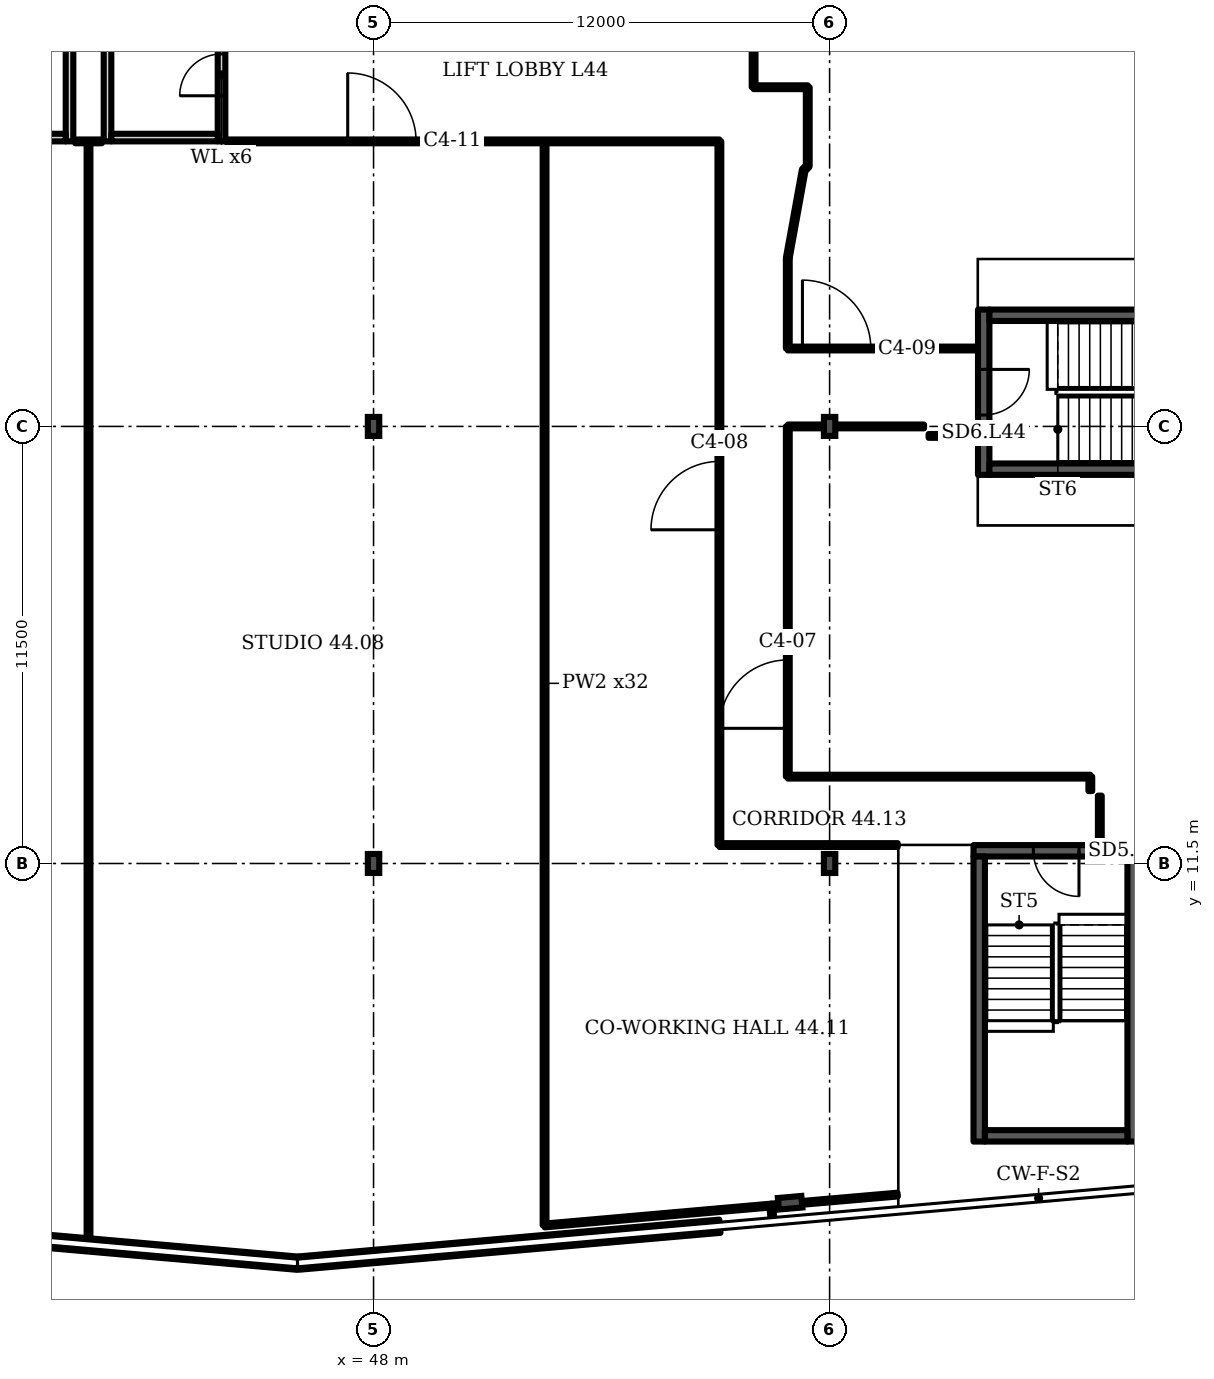
"""IFC4 building model, lengths in metres.
Left out: names, types, materials, properties, quantities, classifications, styles, units other than length and angle.
Written with IfcOpenShell. Run it as: python <this file> out.ifc"""

import sys

from ifc_helpers import new_model, si_unit, direction, frame, frame_2d, origin, origin_2d, place, context, subcontext, project, spatial, rectangle, i_section, extrude, element, fill, save


model = new_model("IFC4")
c1 = context("Model", 3, precision=1e-05, world=origin(), true_north=direction((0.0, 1.0)))
c2 = subcontext(c1, "Body", "Model", "MODEL_VIEW")
j1 = project(units=[si_unit("LENGTHUNIT", "METRE"), si_unit("PLANEANGLEUNIT", "RADIAN")], contexts=[c1])
p1 = place(None, origin())
s1 = spatial("IfcSite", under=j1, at=p1, CompositionType="ELEMENT")
p2 = place(p1, origin())
s2 = spatial("IfcBuilding", under=s1, at=p2, CompositionType="ELEMENT")
p3 = place(p2, frame((0.0, 0.0, 180.7)))
s3 = spatial("IfcBuildingStorey", under=s2, at=p3, CompositionType="ELEMENT", Elevation=180.7)
p4 = place(p3, frame((58.961, 2.573, 0.0), z_axis=(0.0, 0.0, 1.0), x_axis=(0.087156, -0.996198, 0.0)))
e1 = element("IfcColumn", 1, at=p4, inside=s3, PredefinedType="COLUMN", context=c2, shape_type="SweptSolid", body=[
    extrude(i_section(OverallWidth=0.305, OverallDepth=0.62, WebThickness=0.021, FlangeThickness=0.04, FilletRadius=0.027, at=origin_2d()), origin(), (0.0, 0.0, 1.0), 3.6),
])
for number, where, z_axis, x_axis in (
    (2, (48.0, 11.5, 0.0), (0.0, 0.0, 1.0), (1.0, 0.0, 0.0)),
    (3, (60.0, 11.5, 0.0), (0.0, 0.0, 1.0), (1.0, 0.0, 0.0)),
    (4, (48.0, 23.0, 0.0), (0.0, 0.0, 1.0), (1.0, 0.0, 0.0)),
    (5, (60.0, 23.0, 0.0), (0.0, 0.0, 1.0), (1.0, 0.0, 0.0)),
):
    element("IfcColumn", number, at=place(p3, frame(where, z_axis=z_axis, x_axis=x_axis)), inside=s3, PredefinedType="COLUMN", context=c2, shape_type="SweptSolid", body=[
        extrude(i_section(OverallWidth=0.3, OverallDepth=0.5, WebThickness=0.014, FlangeThickness=0.028, FilletRadius=0.027, at=origin_2d()), origin(), (0.0, 0.0, 1.0), 3.6),
    ])
p5 = place(p3, frame((35.03, 1.943, 0.0), z_axis=(0.0, 0.0, 1.0), x_axis=(0.996199, -0.08714, 0.0)))
e6 = element("IfcWall", 6, at=p5, inside=s3, PredefinedType="SOLIDWALL", context=c2, shape_type="SweptSolid", body=[
    extrude(rectangle(XDim=11.028, YDim=0.35, at=frame_2d((5.514, 0.0))), origin(), (0.0, 0.0, 1.0), 1.0),
])
p6 = place(p3, frame((46.045, 0.987, 0.0), z_axis=(0.0, 0.0, 1.0), x_axis=(0.996193, 0.087171, 0.0)))
e7 = element("IfcWall", 7, at=p6, inside=s3, PredefinedType="SOLIDWALL", context=c2, shape_type="SweptSolid", body=[
    extrude(rectangle(XDim=11.11, YDim=0.35, at=frame_2d((5.555, 0.0))), origin(), (0.0, 0.0, 1.0), 1.0),
])
p7 = place(p3, frame((40.0, 30.5, 0.0), z_axis=(0.0, 0.0, 1.0), x_axis=(0.0, 1.0, 0.0)))
e8 = element("IfcWall", 8, at=p7, inside=s3, PredefinedType="PARTITIONING", context=c2, shape_type="SweptSolid", body=[
    extrude(rectangle(XDim=3.5, YDim=0.2, at=frame_2d((1.75, 0.0))), origin(), (0.0, 0.0, 1.0), 3.2),
])
p8 = place(p3, frame((37.1, 30.6, 0.0), z_axis=(0.0, 0.0, 1.0), x_axis=(1.0, 0.0, 0.0)))
e9 = element("IfcWall", 9, at=p8, inside=s3, PredefinedType="PARTITIONING", context=c2, shape_type="SweptSolid", body=[
    extrude(rectangle(XDim=2.8, YDim=0.2, at=frame_2d((1.4, 0.0))), origin(), (0.0, 0.0, 1.0), 3.2),
])
p9 = place(p3, frame((41.0, 30.5, 0.0), z_axis=(0.0, 0.0, 1.0), x_axis=(0.0, 1.0, 0.0)))
e10 = element("IfcWall", 10, at=p9, inside=s3, PredefinedType="PARTITIONING", context=c2, shape_type="SweptSolid", body=[
    extrude(rectangle(XDim=3.5, YDim=0.2, at=frame_2d((1.75, 0.0))), origin(), (0.0, 0.0, 1.0), 3.2),
])
p10 = place(p3, frame((44.0, 30.5, 0.0), z_axis=(0.0, 0.0, 1.0), x_axis=(0.0, 1.0, 0.0)))
e11 = element("IfcWall", 11, at=p10, inside=s3, PredefinedType="PARTITIONING", context=c2, shape_type="SweptSolid", body=[
    extrude(rectangle(XDim=3.5, YDim=0.2, at=frame_2d((1.75, 0.0))), origin(), (0.0, 0.0, 1.0), 3.2),
])
p11 = place(p10, frame((1.2, 0.0, 0.0)))
e12 = element("IfcOpeningElement", 12, at=p11, cuts=e11, PredefinedType="OPENING", context=c2, shape_type="SweptSolid", body=[
    extrude(rectangle(XDim=1.1, YDim=2.1, at=frame_2d((0.55, 1.05))), frame((0.0, 0.11, 0.0), z_axis=(0.0, -1.0, 0.0), x_axis=(1.0, 0.0, 0.0)), (0.0, 0.0, 1.0), 0.22),
])
p12 = place(p3, frame((41.1, 30.6, 0.0), z_axis=(0.0, 0.0, 1.0), x_axis=(1.0, 0.0, 0.0)))
e13 = element("IfcWall", 13, at=p12, inside=s3, PredefinedType="PARTITIONING", context=c2, shape_type="SweptSolid", body=[
    extrude(rectangle(XDim=2.8, YDim=0.2, at=frame_2d((1.4, 0.0))), origin(), (0.0, 0.0, 1.0), 3.2),
])
p13 = place(p3, frame((63.786, 11.834, 0.0), z_axis=(0.0, 0.0, 1.0), x_axis=(1.0, 0.0, 0.0)))
e14 = element("IfcWall", 14, at=p13, inside=s3, PredefinedType="SHEAR", context=c2, shape_type="SweptSolid", body=[
    extrude(rectangle(XDim=4.35, YDim=0.3, at=frame_2d((2.175, 0.0))), origin(), (0.0, 0.0, 1.0), 3.2),
])
p14 = place(p13, frame((1.575, 0.0, 0.0)))
e15 = element("IfcOpeningElement", 15, at=p14, cuts=e14, PredefinedType="OPENING", context=c2, shape_type="SweptSolid", body=[
    extrude(rectangle(XDim=1.2, YDim=2.1, at=frame_2d((0.6, 1.05))), frame((0.0, 0.16, 0.0), z_axis=(0.0, -1.0, 0.0), x_axis=(1.0, 0.0, 0.0)), (0.0, 0.0, 1.0), 0.32),
])
p15 = place(p3, frame((64.055, 21.725, 0.0), z_axis=(0.0, 0.0, 1.0), x_axis=(0.0, 1.0, 0.0)))
e16 = element("IfcWall", 16, at=p15, inside=s3, PredefinedType="SHEAR", context=c2, shape_type="SweptSolid", body=[
    extrude(rectangle(XDim=4.35, YDim=0.3, at=frame_2d((2.175, 0.0))), origin(), (0.0, 0.0, 1.0), 3.2),
])
p16 = place(p15, frame((1.575, 0.0, 0.0)))
e17 = element("IfcOpeningElement", 17, at=p16, cuts=e16, PredefinedType="OPENING", context=c2, shape_type="SweptSolid", body=[
    extrude(rectangle(XDim=1.2, YDim=2.1, at=frame_2d((0.6, 1.05))), frame((0.0, 0.16, 0.0), z_axis=(0.0, -1.0, 0.0), x_axis=(1.0, 0.0, 0.0)), (0.0, 0.0, 1.0), 0.32),
])
p17 = place(p3, frame((40.5, 1.489, 0.0), z_axis=(0.0, 0.0, 1.0), x_axis=(0.0, 1.0, 0.0)))
e18 = element("IfcWall", 18, at=p17, inside=s3, PredefinedType="PARTITIONING", context=c2, shape_type="SweptSolid", body=[
    extrude(rectangle(XDim=29.011, YDim=0.1, at=frame_2d((14.505, 0.0))), origin(), (0.0, 0.0, 1.0), 3.2),
])
p18 = place(p3, frame((52.5, 1.98, 0.0), z_axis=(0.0, 0.0, 1.0), x_axis=(0.0, 1.0, 0.0)))
e19 = element("IfcWall", 19, at=p18, inside=s3, PredefinedType="PARTITIONING", context=c2, shape_type="SweptSolid", body=[
    extrude(rectangle(XDim=28.52, YDim=0.1, at=frame_2d((14.26, 0.0))), origin(), (0.0, 0.0, 1.0), 3.2),
])
p19 = place(p3, frame((52.5, 1.975, 0.0), z_axis=(0.0, 0.0, 1.0), x_axis=(0.99615, 0.087657, 0.0)))
e20 = element("IfcWall", 20, at=p19, inside=s3, PredefinedType="PARTITIONING", context=c2, shape_type="SweptSolid", body=[
    extrude(rectangle(XDim=5.988, YDim=0.1, at=frame_2d((2.994, 0.0))), origin(), (0.0, 0.0, 1.0), 3.2),
])
p20 = place(p3, frame((57.1, 11.985, 0.0), z_axis=(0.0, 0.0, 1.0), x_axis=(0.0, 1.0, 0.0)))
e21 = element("IfcWall", 21, at=p20, inside=s3, PredefinedType="PARTITIONING", context=c2, shape_type="SweptSolid", body=[
    extrude(rectangle(XDim=18.515, YDim=0.1, at=frame_2d((9.257, 0.0))), origin(), (0.0, 0.0, 1.0), 3.2),
])
p21 = place(p20, frame((8.295, 0.0, 0.0)))
e22 = element("IfcOpeningElement", 22, at=p21, cuts=e21, PredefinedType="OPENING", context=c2, shape_type="SweptSolid", body=[
    extrude(rectangle(XDim=1.8, YDim=2.1, at=frame_2d((0.9, 1.05))), frame((0.0, 0.06, 0.0), z_axis=(0.0, -1.0, 0.0), x_axis=(1.0, 0.0, 0.0)), (0.0, 0.0, 1.0), 0.12),
])
p22 = place(p3, frame((57.1, 11.985, 0.0), z_axis=(0.0, 0.0, 1.0), x_axis=(1.0, 0.0, 0.0)))
e23 = element("IfcWall", 23, at=p22, inside=s3, PredefinedType="PARTITIONING", context=c2, shape_type="SweptSolid", body=[
    extrude(rectangle(XDim=4.691, YDim=0.1, at=frame_2d((2.346, 0.0))), origin(), (0.0, 0.0, 1.0), 3.2),
])
p23 = place(p3, frame((58.0, 31.925, 0.0), z_axis=(0.0, 0.0, 1.0), x_axis=(0.0, 1.0, 0.0)))
e24 = element("IfcWall", 24, at=p23, inside=s3, PredefinedType="PARTITIONING", context=c2, shape_type="SweptSolid", body=[
    extrude(rectangle(XDim=2.055, YDim=0.1, at=frame_2d((1.027, 0.0))), origin(), (0.0, 0.0, 1.0), 3.2),
])
p24 = place(p3, frame((58.0, 31.925, 0.0), z_axis=(0.0, 0.0, 1.0), x_axis=(1.0, 0.0, 0.0)))
e25 = element("IfcWall", 25, at=p24, inside=s3, PredefinedType="PARTITIONING", context=c2, shape_type="SweptSolid", body=[
    extrude(rectangle(XDim=1.425, YDim=0.1, at=frame_2d((0.712, 0.0))), origin(), (0.0, 0.0, 1.0), 3.2),
])
p25 = place(p3, frame((58.465, 2.5, 0.0), z_axis=(0.0, 0.0, 1.0), x_axis=(0.996263, 0.086355, 0.0)))
e26 = element("IfcWall", 26, at=p25, inside=s3, PredefinedType="PARTITIONING", context=c2, shape_type="SweptSolid", body=[
    extrude(rectangle(XDim=3.339, YDim=0.1, at=frame_2d((1.669, 0.0))), origin(), (0.0, 0.0, 1.0), 2.58),
])
p26 = place(p3, frame((58.498, 2.102, 0.0), z_axis=(0.0, 0.0, 1.0), x_axis=(-0.083045, 0.996542, 0.0)))
e27 = element("IfcWall", 27, at=p26, inside=s3, PredefinedType="PARTITIONING", context=c2, shape_type="SweptSolid", body=[
    extrude(rectangle(XDim=0.4, YDim=0.1, at=frame_2d((0.2, 0.0))), origin(), (0.0, 0.0, 1.0), 3.2),
])
p27 = place(p3, frame((58.9, 13.785, 0.0), z_axis=(0.0, 0.0, 1.0), x_axis=(0.0, 1.0, 0.0)))
e28 = element("IfcWall", 28, at=p27, inside=s3, PredefinedType="PARTITIONING", context=c2, shape_type="SweptSolid", body=[
    extrude(rectangle(XDim=9.215, YDim=0.1, at=frame_2d((4.607, 0.0))), origin(), (0.0, 0.0, 1.0), 3.2),
])
p28 = place(p27, frame((1.271, 0.0, 0.0)))
e29 = element("IfcOpeningElement", 29, at=p28, cuts=e28, PredefinedType="OPENING", context=c2, shape_type="SweptSolid", body=[
    extrude(rectangle(XDim=1.8, YDim=2.1, at=frame_2d((0.9, 1.05))), frame((0.0, 0.06, 0.0), z_axis=(0.0, -1.0, 0.0), x_axis=(1.0, 0.0, 0.0)), (0.0, 0.0, 1.0), 0.12),
])
p29 = place(p3, frame((58.9, 13.785, 0.0), z_axis=(0.0, 0.0, 1.0), x_axis=(1.0, 0.0, 0.0)))
e30 = element("IfcWall", 30, at=p29, inside=s3, PredefinedType="PARTITIONING", context=c2, shape_type="SweptSolid", body=[
    extrude(rectangle(XDim=7.96, YDim=0.1, at=frame_2d((3.98, 0.0))), origin(), (0.0, 0.0, 1.0), 3.2),
])
p30 = place(p3, frame((58.9, 23.0, 0.0), z_axis=(0.0, 0.0, 1.0), x_axis=(1.0, 0.0, 0.0)))
e31 = element("IfcWall", 31, at=p30, inside=s3, PredefinedType="PARTITIONING", context=c2, shape_type="SweptSolid", body=[
    extrude(rectangle(XDim=3.585, YDim=0.1, at=frame_2d((1.792, 0.0))), origin(), (0.0, 0.0, 1.0), 3.2),
])
p31 = place(p3, frame((58.9, 25.05, 0.0), z_axis=(0.0, 0.0, 1.0), x_axis=(0.0, 1.0, 0.0)))
e32 = element("IfcWall", 32, at=p31, inside=s3, PredefinedType="PARTITIONING", context=c2, shape_type="SweptSolid", body=[
    extrude(rectangle(XDim=2.385, YDim=0.1, at=frame_2d((1.192, 0.0))), origin(), (0.0, 0.0, 1.0), 3.2),
])
p32 = place(p3, frame((58.9, 25.05, 0.0), z_axis=(0.0, 0.0, 1.0), x_axis=(1.0, 0.0, 0.0)))
e33 = element("IfcWall", 33, at=p32, inside=s3, PredefinedType="PARTITIONING", context=c2, shape_type="SweptSolid", body=[
    extrude(rectangle(XDim=4.985, YDim=0.1, at=frame_2d((2.492, 0.0))), origin(), (0.0, 0.0, 1.0), 3.2),
])
p33 = place(p32, frame((0.385, 0.0, 0.0)))
e34 = element("IfcOpeningElement", 34, at=p33, cuts=e33, PredefinedType="OPENING", context=c2, shape_type="SweptSolid", body=[
    extrude(rectangle(XDim=1.8, YDim=2.1, at=frame_2d((0.9, 1.05))), frame((0.0, 0.06, 0.0), z_axis=(0.0, -1.0, 0.0), x_axis=(1.0, 0.0, 0.0)), (0.0, 0.0, 1.0), 0.12),
])
p34 = place(p3, frame((58.9, 27.435, 0.0), z_axis=(0.0, 0.0, 1.0), x_axis=(0.178584, 0.983924, 0.0)))
e35 = element("IfcWall", 35, at=p34, inside=s3, PredefinedType="PARTITIONING", context=c2, shape_type="SweptSolid", body=[
    extrude(rectangle(XDim=2.353, YDim=0.1, at=frame_2d((1.176, 0.0))), origin(), (0.0, 0.0, 1.0), 3.2),
])
p35 = place(p3, frame((59.32, 29.75, 0.0), z_axis=(0.0, 0.0, 1.0), x_axis=(0.741581, 0.670872, 0.0)))
e36 = element("IfcWall", 36, at=p35, inside=s3, PredefinedType="PARTITIONING", context=c2, shape_type="SweptSolid", body=[
    extrude(rectangle(XDim=0.142, YDim=0.1, at=frame_2d((0.071, 0.0))), origin(), (0.0, 0.0, 1.0), 3.2),
])
p36 = place(p3, frame((59.425, 29.845, 0.0), z_axis=(0.0, 0.0, 1.0), x_axis=(0.0, 1.0, 0.0)))
e37 = element("IfcWall", 37, at=p36, inside=s3, PredefinedType="PARTITIONING", context=c2, shape_type="SweptSolid", body=[
    extrude(rectangle(XDim=2.08, YDim=0.1, at=frame_2d((1.04, 0.0))), origin(), (0.0, 0.0, 1.0), 3.2),
])
p37 = place(p3, frame((62.605, 22.75, 0.0), z_axis=(0.0, 0.0, 1.0), x_axis=(1.0, 0.0, 0.0)))
e38 = element("IfcWall", 38, at=p37, inside=s3, PredefinedType="PARTITIONING", context=c2, shape_type="SweptSolid", body=[
    extrude(rectangle(XDim=1.28, YDim=0.1, at=frame_2d((0.64, 0.0))), origin(), (0.0, 0.0, 1.0), 3.2),
])
p38 = place(p3, frame((66.86, 13.405, 0.0), z_axis=(0.0, 0.0, 1.0), x_axis=(0.0, 1.0, 0.0)))
e39 = element("IfcWall", 39, at=p38, inside=s3, PredefinedType="PARTITIONING", context=c2, shape_type="SweptSolid", body=[
    extrude(rectangle(XDim=0.38, YDim=0.1, at=frame_2d((0.19, 0.0))), origin(), (0.0, 0.0, 1.0), 3.2),
])
p39 = place(p3, frame((67.11, 12.004, 0.0), z_axis=(0.0, 0.0, 1.0), x_axis=(0.0, 1.0, 0.0)))
e40 = element("IfcWall", 40, at=p39, inside=s3, PredefinedType="PARTITIONING", context=c2, shape_type="SweptSolid", body=[
    extrude(rectangle(XDim=1.281, YDim=0.1, at=frame_2d((0.641, 0.0))), origin(), (0.0, 0.0, 1.0), 3.2),
])
p40 = place(p3, frame((40.15, 30.5, 0.0), z_axis=(0.0, 0.0, 1.0), x_axis=(1.0, 0.0, 0.0)))
e41 = element("IfcWall", 41, at=p40, inside=s3, PredefinedType="PARTITIONING", context=c2, shape_type="SweptSolid", body=[
    extrude(rectangle(XDim=0.7, YDim=0.1, at=frame_2d((0.35, 0.0))), origin(), (0.0, 0.0, 1.0), 3.2),
])
p41 = place(p3, frame((44.15, 30.5, 0.0), z_axis=(0.0, 0.0, 1.0), x_axis=(1.0, 0.0, 0.0)))
e42 = element("IfcWall", 42, at=p41, inside=s3, PredefinedType="PARTITIONING", context=c2, shape_type="SweptSolid", body=[
    extrude(rectangle(XDim=12.95, YDim=0.1, at=frame_2d((6.475, 0.0))), origin(), (0.0, 0.0, 1.0), 3.2),
])
p42 = place(p41, frame((3.17, 0.0, 0.0)))
e43 = element("IfcOpeningElement", 43, at=p42, cuts=e42, PredefinedType="OPENING", context=c2, shape_type="SweptSolid", body=[
    extrude(rectangle(XDim=1.8, YDim=2.1, at=frame_2d((0.9, 1.05))), frame((0.0, 0.06, 0.0), z_axis=(0.0, -1.0, 0.0), x_axis=(1.0, 0.0, 0.0)), (0.0, 0.0, 1.0), 0.12),
])
for number, where, z_axis, x_axis in (
    (44, (63.936, 4.184, 0.0), (0.0, 0.0, 1.0), (0.0, 1.0, 0.0)),
    (45, (67.986, 4.184, 0.0), (0.0, 0.0, 1.0), (0.0, 1.0, 0.0)),
):
    element("IfcWall", number, at=place(p3, frame(where, z_axis=z_axis, x_axis=x_axis)), inside=s3, PredefinedType="SHEAR", context=c2, shape_type="SweptSolid", body=[
        extrude(rectangle(XDim=7.5, YDim=0.3, at=frame_2d((3.75, 0.0))), origin(), (0.0, 0.0, 1.0), 3.2),
    ])
p43 = place(p3, frame((64.086, 4.334, 0.0), z_axis=(0.0, 0.0, 1.0), x_axis=(1.0, 0.0, 0.0)))
e46 = element("IfcWall", 46, at=p43, inside=s3, PredefinedType="SHEAR", context=c2, shape_type="SweptSolid", body=[
    extrude(rectangle(XDim=3.75, YDim=0.3, at=frame_2d((1.875, 0.0))), origin(), (0.0, 0.0, 1.0), 3.2),
])
for number, where, z_axis, x_axis in (
    (47, (64.205, 21.875, 0.0), (0.0, 0.0, 1.0), (1.0, 0.0, 0.0)),
    (48, (64.205, 25.925, 0.0), (0.0, 0.0, 1.0), (1.0, 0.0, 0.0)),
):
    element("IfcWall", number, at=place(p3, frame(where, z_axis=z_axis, x_axis=x_axis)), inside=s3, PredefinedType="SHEAR", context=c2, shape_type="SweptSolid", body=[
        extrude(rectangle(XDim=7.5, YDim=0.3, at=frame_2d((3.75, 0.0))), origin(), (0.0, 0.0, 1.0), 3.2),
    ])
p44 = place(p11, origin())
e49 = element("IfcDoor", 49, at=p44, inside=s3, OperationType="SINGLE_SWING_LEFT", PredefinedType="DOOR", context=c2, shape_type="SweptSolid", body=[
    extrude(rectangle(XDim=1.1, YDim=2.1, at=frame_2d((0.55, 1.05))), frame((0.0, 0.025, 0.0), z_axis=(0.0, -1.0, 0.0), x_axis=(1.0, 0.0, 0.0)), (0.0, 0.0, 1.0), 0.05),
])
fill(e12, e49)
p45 = place(p14, origin())
e50 = element("IfcDoor", 50, at=p45, inside=s3, OperationType="SINGLE_SWING_RIGHT", PredefinedType="DOOR", context=c2, shape_type="SweptSolid", body=[
    extrude(rectangle(XDim=1.2, YDim=2.1, at=frame_2d((0.6, 1.05))), frame((0.0, 0.025, 0.0), z_axis=(0.0, -1.0, 0.0), x_axis=(1.0, 0.0, 0.0)), (0.0, 0.0, 1.0), 0.05),
])
fill(e15, e50)
p46 = place(p16, origin())
e51 = element("IfcDoor", 51, at=p46, inside=s3, OperationType="SINGLE_SWING_RIGHT", PredefinedType="DOOR", context=c2, shape_type="SweptSolid", body=[
    extrude(rectangle(XDim=1.2, YDim=2.1, at=frame_2d((0.6, 1.05))), frame((0.0, 0.025, 0.0), z_axis=(0.0, -1.0, 0.0), x_axis=(1.0, 0.0, 0.0)), (0.0, 0.0, 1.0), 0.05),
])
fill(e17, e51)
p47 = place(p28, origin())
e52 = element("IfcDoor", 52, at=p47, inside=s3, OperationType="DOUBLE_DOOR_SINGLE_SWING", PredefinedType="DOOR", context=c2, shape_type="SweptSolid", body=[
    extrude(rectangle(XDim=1.8, YDim=2.1, at=frame_2d((0.9, 1.05))), frame((0.0, 0.025, 0.0), z_axis=(0.0, -1.0, 0.0), x_axis=(1.0, 0.0, 0.0)), (0.0, 0.0, 1.0), 0.05),
])
fill(e29, e52)
p48 = place(p21, origin())
e53 = element("IfcDoor", 53, at=p48, inside=s3, OperationType="DOUBLE_DOOR_SINGLE_SWING", PredefinedType="DOOR", context=c2, shape_type="SweptSolid", body=[
    extrude(rectangle(XDim=1.8, YDim=2.1, at=frame_2d((0.9, 1.05))), frame((0.0, 0.025, 0.0), z_axis=(0.0, -1.0, 0.0), x_axis=(1.0, 0.0, 0.0)), (0.0, 0.0, 1.0), 0.05),
])
fill(e22, e53)
p49 = place(p33, origin())
e54 = element("IfcDoor", 54, at=p49, inside=s3, OperationType="DOUBLE_DOOR_SINGLE_SWING", PredefinedType="DOOR", context=c2, shape_type="SweptSolid", body=[
    extrude(rectangle(XDim=1.8, YDim=2.1, at=frame_2d((0.9, 1.05))), frame((0.0, 0.025, 0.0), z_axis=(0.0, -1.0, 0.0), x_axis=(1.0, 0.0, 0.0)), (0.0, 0.0, 1.0), 0.05),
])
fill(e34, e54)
p50 = place(p42, origin())
e55 = element("IfcDoor", 55, at=p50, inside=s3, OperationType="DOUBLE_DOOR_SINGLE_SWING", PredefinedType="DOOR", context=c2, shape_type="SweptSolid", body=[
    extrude(rectangle(XDim=1.8, YDim=2.1, at=frame_2d((0.9, 1.05))), frame((0.0, 0.025, 0.0), z_axis=(0.0, -1.0, 0.0), x_axis=(1.0, 0.0, 0.0)), (0.0, 0.0, 1.0), 0.05),
])
fill(e43, e55)
save(model, sys.argv[1])
